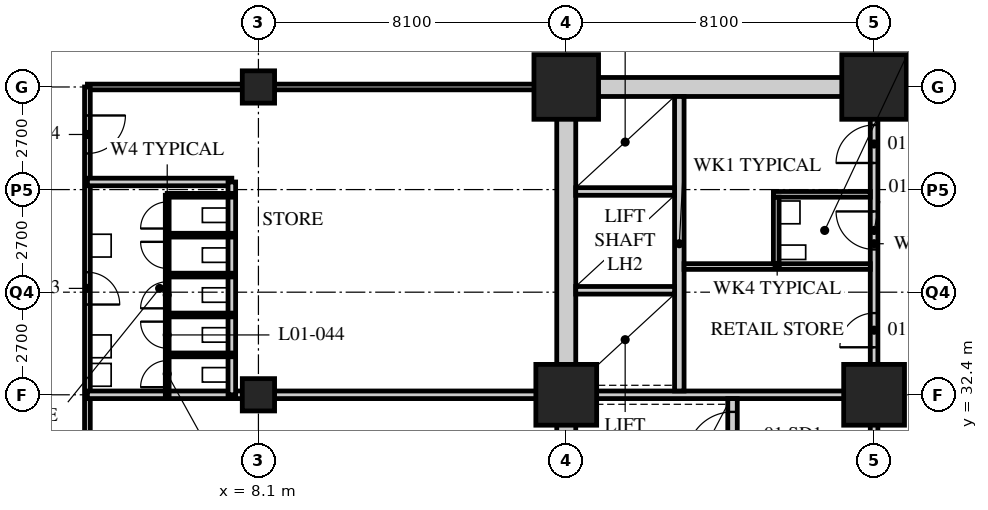
"""IFC4 building model, lengths in metres.
Left out: names, types, materials, properties, quantities, classifications, styles, units other than length and angle.
Written with IfcOpenShell. Run it as: python <this file> out.ifc"""

import sys

from ifc_helpers import new_model, si_unit, direction, frame, frame_2d, origin, origin_2d, place, context, subcontext, project, spatial, rectangle, hollow_rectangle, extrude, element, fill, save


model = new_model("IFC4")
c1 = context("Model", 3, precision=1e-05, world=origin(), true_north=direction((0.0, 1.0)))
c2 = subcontext(c1, "Body", "Model", "MODEL_VIEW")
j1 = project(units=[si_unit("LENGTHUNIT", "METRE"), si_unit("PLANEANGLEUNIT", "RADIAN")], contexts=[c1])
p1 = place(None, origin())
s1 = spatial("IfcSite", under=j1, at=p1, CompositionType="ELEMENT")
p2 = place(p1, origin())
s2 = spatial("IfcBuilding", under=s1, at=p2, CompositionType="ELEMENT")
p3 = place(p2, frame((0.0, 0.0, 6.0)))
s3 = spatial("IfcBuildingStorey", under=s2, at=p3, CompositionType="ELEMENT", Elevation=6.0)
for number, where, z_axis, x_axis in (
    (1, (8.1, 32.4, 0.0), (0.0, 0.0, 1.0), (1.0, 0.0, 0.0)),
    (2, (8.1, 40.5, 0.0), (0.0, 0.0, 1.0), (1.0, 0.0, 0.0)),
):
    element("IfcColumn", number, at=place(p3, frame(where, z_axis=z_axis, x_axis=x_axis)), inside=s3, PredefinedType="COLUMN", context=c2, shape_type="SweptSolid", body=[
        extrude(hollow_rectangle(XDim=0.85, YDim=0.85, WallThickness=0.085, at=origin_2d()), origin(), (0.0, 0.0, 1.0), 5.4),
    ])
p4 = place(p3, frame((16.2, 32.4, 0.0), z_axis=(0.0, 0.0, 1.0), x_axis=(1.0, 0.0, 0.0)))
e3 = element("IfcColumn", 3, at=p4, inside=s3, PredefinedType="COLUMN", context=c2, shape_type="SweptSolid", body=[
    extrude(hollow_rectangle(XDim=1.6, YDim=1.6, WallThickness=0.15, at=origin_2d()), origin(), (0.0, 0.0, 1.0), 5.4),
])
p5 = place(p3, frame((16.2, 40.5, 0.0), z_axis=(0.0, 0.0, 1.0), x_axis=(1.0, 0.0, 0.0)))
e4 = element("IfcColumn", 4, at=p5, inside=s3, PredefinedType="COLUMN", context=c2, shape_type="SweptSolid", body=[
    extrude(hollow_rectangle(XDim=1.7, YDim=1.7, WallThickness=0.16, at=origin_2d()), origin(), (0.0, 0.0, 1.0), 5.4),
])
p6 = place(p3, frame((24.3, 32.4, 0.0), z_axis=(0.0, 0.0, 1.0), x_axis=(1.0, 0.0, 0.0)))
e5 = element("IfcColumn", 5, at=p6, inside=s3, PredefinedType="COLUMN", context=c2, shape_type="SweptSolid", body=[
    extrude(hollow_rectangle(XDim=1.6, YDim=1.6, WallThickness=0.15, at=origin_2d()), origin(), (0.0, 0.0, 1.0), 5.4),
])
p7 = place(p3, frame((24.3, 40.5, 0.0), z_axis=(0.0, 0.0, 1.0), x_axis=(1.0, 0.0, 0.0)))
e6 = element("IfcColumn", 6, at=p7, inside=s3, PredefinedType="COLUMN", context=c2, shape_type="SweptSolid", body=[
    extrude(hollow_rectangle(XDim=1.7, YDim=1.7, WallThickness=0.16, at=origin_2d()), origin(), (0.0, 0.0, 1.0), 5.4),
])
p8 = place(p3, frame((16.0, 40.5, 0.0), z_axis=(0.0, 0.0, 1.0), x_axis=(-1.0, 0.0, 0.0)))
e7 = element("IfcWall", 7, at=p8, inside=s3, PredefinedType="PARTITIONING", context=c2, shape_type="SweptSolid", body=[
    extrude(rectangle(XDim=12.4, YDim=0.15, at=frame_2d((6.2, 0.0))), origin(), (0.0, 0.0, 1.0), 4.538),
])
p9 = place(p3, frame((3.6, 40.5, 0.0), z_axis=(0.0, 0.0, 1.0), x_axis=(0.0, -1.0, 0.0)))
e8 = element("IfcWall", 8, at=p9, inside=s3, PredefinedType="PARTITIONING", context=c2, shape_type="SweptSolid", body=[
    extrude(rectangle(XDim=36.9, YDim=0.15, at=frame_2d((18.45, 0.0))), origin(), (0.0, 0.0, 1.0), 5.15),
])
p10 = place(p9, frame((13.375, 0.0, 0.0)))
e9 = element("IfcOpeningElement", 9, at=p10, cuts=e8, PredefinedType="OPENING", context=c2, shape_type="SweptSolid", body=[
    extrude(rectangle(XDim=0.85, YDim=2.1, at=frame_2d((0.425, 1.05))), frame((0.0, 0.085, 0.0), z_axis=(0.0, -1.0, 0.0), x_axis=(1.0, 0.0, 0.0)), (0.0, 0.0, 1.0), 0.17),
])
p11 = place(p9, frame((9.25, 0.0, 0.0)))
e10 = element("IfcOpeningElement", 10, at=p11, cuts=e8, PredefinedType="OPENING", context=c2, shape_type="SweptSolid", body=[
    extrude(rectangle(XDim=1.0, YDim=2.1, at=frame_2d((0.5, 1.05))), frame((0.0, 0.085, 0.0), z_axis=(0.0, -1.0, 0.0), x_axis=(1.0, 0.0, 0.0)), (0.0, 0.0, 1.0), 0.17),
])
p12 = place(p9, frame((4.875, 0.0, 0.0)))
e11 = element("IfcOpeningElement", 11, at=p12, cuts=e8, PredefinedType="OPENING", context=c2, shape_type="SweptSolid", body=[
    extrude(rectangle(XDim=0.85, YDim=2.1, at=frame_2d((0.425, 1.05))), frame((0.0, 0.085, 0.0), z_axis=(0.0, -1.0, 0.0), x_axis=(1.0, 0.0, 0.0)), (0.0, 0.0, 1.0), 0.17),
])
p13 = place(p9, frame((0.75, 0.0, 0.0)))
e12 = element("IfcOpeningElement", 12, at=p13, cuts=e8, PredefinedType="OPENING", context=c2, shape_type="SweptSolid", body=[
    extrude(rectangle(XDim=1.0, YDim=2.1, at=frame_2d((0.5, 1.05))), frame((0.0, 0.085, 0.0), z_axis=(0.0, -1.0, 0.0), x_axis=(1.0, 0.0, 0.0)), (0.0, 0.0, 1.0), 0.17),
])
p14 = place(p3, frame((3.6, 32.4, 0.0), z_axis=(0.0, 0.0, 1.0), x_axis=(1.0, 0.0, 0.0)))
e13 = element("IfcWall", 13, at=p14, inside=s3, PredefinedType="SOLIDWALL", context=c2, shape_type="SweptSolid", body=[
    extrude(rectangle(XDim=12.6, YDim=0.2, at=frame_2d((6.3, 0.0))), origin(), (0.0, 0.0, 1.0), 4.538),
])
p15 = place(p3, frame((3.6, 38.0, 0.0), z_axis=(0.0, 0.0, 1.0), x_axis=(1.0, 0.0, 0.0)))
e14 = element("IfcWall", 14, at=p15, inside=s3, PredefinedType="SOLIDWALL", context=c2, shape_type="SweptSolid", body=[
    extrude(rectangle(XDim=3.8, YDim=0.2, at=frame_2d((1.9, 0.0))), origin(), (0.0, 0.0, 1.0), 5.15),
])
p16 = place(p3, frame((7.4, 32.4, 0.0), z_axis=(0.0, 0.0, 1.0), x_axis=(0.0, 1.0, 0.0)))
e15 = element("IfcWall", 15, at=p16, inside=s3, PredefinedType="SOLIDWALL", context=c2, shape_type="SweptSolid", body=[
    extrude(rectangle(XDim=5.6, YDim=0.2, at=frame_2d((2.8, 0.0))), origin(), (0.0, 0.0, 1.0), 5.15),
])
p17 = place(p3, frame((5.7, 32.4, 0.0), z_axis=(0.0, 0.0, 1.0), x_axis=(0.0, 1.0, 0.0)))
e16 = element("IfcWall", 16, at=p17, inside=s3, PredefinedType="PARTITIONING", context=c2, shape_type="SweptSolid", body=[
    extrude(rectangle(XDim=5.25, YDim=0.1, at=frame_2d((2.625, 0.0))), origin(), (0.0, 0.0, 1.0), 5.15),
])
p18 = place(p17, frame((0.2, 0.0, 0.0)))
e17 = element("IfcOpeningElement", 17, at=p18, cuts=e16, PredefinedType="OPENING", context=c2, shape_type="SweptSolid", body=[
    extrude(rectangle(XDim=0.7, YDim=2.0, at=frame_2d((0.35, 1.0))), frame((0.0, 0.06, 0.0), z_axis=(0.0, -1.0, 0.0), x_axis=(1.0, 0.0, 0.0)), (0.0, 0.0, 1.0), 0.12),
])
p19 = place(p17, frame((1.225, 0.0, 0.0)))
e18 = element("IfcOpeningElement", 18, at=p19, cuts=e16, PredefinedType="OPENING", context=c2, shape_type="SweptSolid", body=[
    extrude(rectangle(XDim=0.7, YDim=2.0, at=frame_2d((0.35, 1.0))), frame((0.0, 0.06, 0.0), z_axis=(0.0, -1.0, 0.0), x_axis=(1.0, 0.0, 0.0)), (0.0, 0.0, 1.0), 0.12),
])
p20 = place(p17, frame((2.275, 0.0, 0.0)))
e19 = element("IfcOpeningElement", 19, at=p20, cuts=e16, PredefinedType="OPENING", context=c2, shape_type="SweptSolid", body=[
    extrude(rectangle(XDim=0.7, YDim=2.0, at=frame_2d((0.35, 1.0))), frame((0.0, 0.06, 0.0), z_axis=(0.0, -1.0, 0.0), x_axis=(1.0, 0.0, 0.0)), (0.0, 0.0, 1.0), 0.12),
])
p21 = place(p17, frame((3.325, 0.0, 0.0)))
e20 = element("IfcOpeningElement", 20, at=p21, cuts=e16, PredefinedType="OPENING", context=c2, shape_type="SweptSolid", body=[
    extrude(rectangle(XDim=0.7, YDim=2.0, at=frame_2d((0.35, 1.0))), frame((0.0, 0.06, 0.0), z_axis=(0.0, -1.0, 0.0), x_axis=(1.0, 0.0, 0.0)), (0.0, 0.0, 1.0), 0.12),
])
p22 = place(p17, frame((4.375, 0.0, 0.0)))
e21 = element("IfcOpeningElement", 21, at=p22, cuts=e16, PredefinedType="OPENING", context=c2, shape_type="SweptSolid", body=[
    extrude(rectangle(XDim=0.7, YDim=2.0, at=frame_2d((0.35, 1.0))), frame((0.0, 0.06, 0.0), z_axis=(0.0, -1.0, 0.0), x_axis=(1.0, 0.0, 0.0)), (0.0, 0.0, 1.0), 0.12),
])
for number, where, z_axis, x_axis in (
    (22, (5.7, 33.45, 0.0), (0.0, 0.0, 1.0), (1.0, 0.0, 0.0)),
    (23, (5.7, 34.5, 0.0), (0.0, 0.0, 1.0), (1.0, 0.0, 0.0)),
    (24, (5.7, 35.55, 0.0), (0.0, 0.0, 1.0), (1.0, 0.0, 0.0)),
    (25, (5.7, 36.6, 0.0), (0.0, 0.0, 1.0), (1.0, 0.0, 0.0)),
    (26, (5.7, 37.65, 0.0), (0.0, 0.0, 1.0), (1.0, 0.0, 0.0)),
):
    element("IfcWall", number, at=place(p3, frame(where, z_axis=z_axis, x_axis=x_axis)), inside=s3, PredefinedType="PARTITIONING", context=c2, shape_type="SweptSolid", body=[
        extrude(rectangle(XDim=1.7, YDim=0.1, at=frame_2d((0.85, 0.0))), origin(), (0.0, 0.0, 1.0), 5.15),
    ])
p23 = place(p3, frame((15.95, 40.5, 0.0), z_axis=(0.0, 0.0, 1.0), x_axis=(1.0, 0.0, 0.0)))
e27 = element("IfcWall", 27, at=p23, inside=s3, PredefinedType="SOLIDWALL", context=c2, shape_type="SweptSolid", body=[
    extrude(rectangle(XDim=24.8, YDim=0.5, at=frame_2d((12.4, 0.0))), origin(), (0.0, 0.0, 1.0), 4.5),
])
p24 = place(p23, frame((11.5, 0.0, 0.0)))
e28 = element("IfcOpeningElement", 28, at=p24, cuts=e27, PredefinedType="OPENING", context=c2, shape_type="SweptSolid", body=[
    extrude(rectangle(XDim=1.8, YDim=2.4, at=frame_2d((0.9, 1.2))), frame((0.0, 0.26, 0.0), z_axis=(0.0, -1.0, 0.0), x_axis=(1.0, 0.0, 0.0)), (0.0, 0.0, 1.0), 0.52),
])
p25 = place(p3, frame((16.2, 24.55, 0.0), z_axis=(0.0, 0.0, 1.0), x_axis=(0.0, 1.0, 0.0)))
e29 = element("IfcWall", 29, at=p25, inside=s3, PredefinedType="SOLIDWALL", context=c2, shape_type="SweptSolid", body=[
    extrude(rectangle(XDim=15.7, YDim=0.5, at=frame_2d((7.85, 0.0))), origin(), (0.0, 0.0, 1.0), 4.538),
])
p26 = place(p3, frame((16.45, 32.4, 0.0), z_axis=(0.0, 0.0, 1.0), x_axis=(1.0, 0.0, 0.0)))
e30 = element("IfcWall", 30, at=p26, inside=s3, PredefinedType="SOLIDWALL", context=c2, shape_type="SweptSolid", body=[
    extrude(rectangle(XDim=7.95, YDim=0.2, at=frame_2d((3.975, 0.0))), origin(), (0.0, 0.0, 1.0), 4.45),
])
p27 = place(p3, frame((24.3, 24.55, 0.0), z_axis=(0.0, 0.0, 1.0), x_axis=(0.0, 1.0, 0.0)))
e31 = element("IfcWall", 31, at=p27, inside=s3, PredefinedType="SOLIDWALL", context=c2, shape_type="SweptSolid", body=[
    extrude(rectangle(XDim=7.75, YDim=0.2, at=frame_2d((3.875, 0.0))), origin(), (0.0, 0.0, 1.0), 4.45),
])
p28 = place(p27, frame((4.6, 0.0, 0.0)))
e32 = element("IfcOpeningElement", 32, at=p28, cuts=e31, PredefinedType="OPENING", context=c2, shape_type="SweptSolid", body=[
    extrude(rectangle(XDim=1.2, YDim=2.1, at=frame_2d((0.6, 1.05))), frame((0.0, 0.11, 0.0), z_axis=(0.0, -1.0, 0.0), x_axis=(1.0, 0.0, 0.0)), (0.0, 0.0, 1.0), 0.22),
])
p29 = place(p3, frame((20.575, 24.55, 0.0), z_axis=(0.0, 0.0, 1.0), x_axis=(0.0, 1.0, 0.0)))
e33 = element("IfcWall", 33, at=p29, inside=s3, PredefinedType="SOLIDWALL", context=c2, shape_type="SweptSolid", body=[
    extrude(rectangle(XDim=7.75, YDim=0.25, at=frame_2d((3.875, 0.0))), origin(), (0.0, 0.0, 1.0), 5.15),
])
p30 = place(p29, frame((6.2, 0.0, 0.0)))
e34 = element("IfcOpeningElement", 34, at=p30, cuts=e33, PredefinedType="OPENING", context=c2, shape_type="SweptSolid", body=[
    extrude(rectangle(XDim=1.2, YDim=2.1, at=frame_2d((0.6, 1.05))), frame((0.0, 0.135, 0.0), z_axis=(0.0, -1.0, 0.0), x_axis=(1.0, 0.0, 0.0)), (0.0, 0.0, 1.0), 0.27),
])
p31 = place(p3, frame((19.175, 32.5, 0.0), z_axis=(0.0, 0.0, 1.0), x_axis=(0.0, 1.0, 0.0)))
e35 = element("IfcWall", 35, at=p31, inside=s3, PredefinedType="SOLIDWALL", context=c2, shape_type="SweptSolid", body=[
    extrude(rectangle(XDim=7.75, YDim=0.25, at=frame_2d((3.875, 0.0))), origin(), (0.0, 0.0, 1.0), 5.15),
])
for number, where, z_axis, x_axis in (
    (36, (16.45, 35.15, 0.0), (0.0, 0.0, 1.0), (1.0, 0.0, 0.0)),
    (37, (16.45, 37.75, 0.0), (0.0, 0.0, 1.0), (1.0, 0.0, 0.0)),
):
    element("IfcWall", number, at=place(p3, frame(where, z_axis=z_axis, x_axis=x_axis)), inside=s3, PredefinedType="SOLIDWALL", context=c2, shape_type="SweptSolid", body=[
        extrude(rectangle(XDim=2.6, YDim=0.2, at=frame_2d((1.3, 0.0))), origin(), (0.0, 0.0, 1.0), 5.15),
    ])
p32 = place(p3, frame((24.3, 32.5, 0.0), z_axis=(0.0, 0.0, 1.0), x_axis=(0.0, 1.0, 0.0)))
e38 = element("IfcWall", 38, at=p32, inside=s3, PredefinedType="PARTITIONING", context=c2, shape_type="SweptSolid", body=[
    extrude(rectangle(XDim=7.75, YDim=0.2, at=frame_2d((3.875, 0.0))), origin(), (0.0, 0.0, 1.0), 4.45),
])
p33 = place(p32, frame((1.15, 0.0, 0.0)))
e39 = element("IfcOpeningElement", 39, at=p33, cuts=e38, PredefinedType="OPENING", context=c2, shape_type="SweptSolid", body=[
    extrude(rectangle(XDim=0.9, YDim=2.1, at=frame_2d((0.45, 1.05))), frame((0.0, 0.11, 0.0), z_axis=(0.0, -1.0, 0.0), x_axis=(1.0, 0.0, 0.0)), (0.0, 0.0, 1.0), 0.22),
])
p34 = place(p32, frame((3.725, 0.0, 0.0)))
e40 = element("IfcOpeningElement", 40, at=p34, cuts=e38, PredefinedType="OPENING", context=c2, shape_type="SweptSolid", body=[
    extrude(rectangle(XDim=1.0, YDim=2.1, at=frame_2d((0.5, 1.05))), frame((0.0, 0.11, 0.0), z_axis=(0.0, -1.0, 0.0), x_axis=(1.0, 0.0, 0.0)), (0.0, 0.0, 1.0), 0.22),
])
p35 = place(p32, frame((6.0, 0.0, 0.0)))
e41 = element("IfcOpeningElement", 41, at=p35, cuts=e38, PredefinedType="OPENING", context=c2, shape_type="SweptSolid", body=[
    extrude(rectangle(XDim=1.0, YDim=2.1, at=frame_2d((0.5, 1.05))), frame((0.0, 0.11, 0.0), z_axis=(0.0, -1.0, 0.0), x_axis=(1.0, 0.0, 0.0)), (0.0, 0.0, 1.0), 0.22),
])
p36 = place(p3, frame((19.3, 35.775, 0.0), z_axis=(0.0, 0.0, 1.0), x_axis=(1.0, 0.0, 0.0)))
e42 = element("IfcWall", 42, at=p36, inside=s3, PredefinedType="PARTITIONING", context=c2, shape_type="SweptSolid", body=[
    extrude(rectangle(XDim=4.9, YDim=0.15, at=frame_2d((2.45, 0.0))), origin(), (0.0, 0.0, 1.0), 5.15),
])
p37 = place(p3, frame((21.65, 37.675, 0.0), z_axis=(0.0, 0.0, 1.0), x_axis=(1.0, 0.0, 0.0)))
e43 = element("IfcWall", 43, at=p37, inside=s3, PredefinedType="PARTITIONING", context=c2, shape_type="SweptSolid", body=[
    extrude(rectangle(XDim=2.55, YDim=0.15, at=frame_2d((1.275, 0.0))), origin(), (0.0, 0.0, 1.0), 5.15),
])
p38 = place(p3, frame((21.725, 35.85, 0.0), z_axis=(0.0, 0.0, 1.0), x_axis=(0.0, 1.0, 0.0)))
e44 = element("IfcWall", 44, at=p38, inside=s3, PredefinedType="PARTITIONING", context=c2, shape_type="SweptSolid", body=[
    extrude(rectangle(XDim=1.75, YDim=0.15, at=frame_2d((0.875, 0.0))), origin(), (0.0, 0.0, 1.0), 5.15),
])
p39 = place(p12, origin())
e45 = element("IfcDoor", 45, at=p39, inside=s3, OperationType="SINGLE_SWING_RIGHT", PredefinedType="DOOR", context=c2, shape_type="SweptSolid", body=[
    extrude(rectangle(XDim=0.85, YDim=2.1, at=frame_2d((0.425, 1.05))), frame((0.0, 0.025, 0.0), z_axis=(0.0, -1.0, 0.0), x_axis=(1.0, 0.0, 0.0)), (0.0, 0.0, 1.0), 0.05),
])
fill(e11, e45)
p40 = place(p13, origin())
e46 = element("IfcDoor", 46, at=p40, inside=s3, OperationType="SINGLE_SWING_LEFT", PredefinedType="DOOR", context=c2, shape_type="SweptSolid", body=[
    extrude(rectangle(XDim=1.0, YDim=2.1, at=frame_2d((0.5, 1.05))), frame((0.0, 0.025, 0.0), z_axis=(0.0, -1.0, 0.0), x_axis=(1.0, 0.0, 0.0)), (0.0, 0.0, 1.0), 0.05),
])
fill(e12, e46)
p41 = place(p18, origin())
e47 = element("IfcDoor", 47, at=p41, inside=s3, OperationType="SINGLE_SWING_LEFT", PredefinedType="DOOR", context=c2, shape_type="SweptSolid", body=[
    extrude(rectangle(XDim=0.7, YDim=2.0, at=frame_2d((0.35, 1.0))), frame((0.0, 0.025, 0.0), z_axis=(0.0, -1.0, 0.0), x_axis=(1.0, 0.0, 0.0)), (0.0, 0.0, 1.0), 0.05),
])
fill(e17, e47)
p42 = place(p19, origin())
e48 = element("IfcDoor", 48, at=p42, inside=s3, OperationType="SINGLE_SWING_RIGHT", PredefinedType="DOOR", context=c2, shape_type="SweptSolid", body=[
    extrude(rectangle(XDim=0.7, YDim=2.0, at=frame_2d((0.35, 1.0))), frame((0.0, 0.025, 0.0), z_axis=(0.0, -1.0, 0.0), x_axis=(1.0, 0.0, 0.0)), (0.0, 0.0, 1.0), 0.05),
])
fill(e18, e48)
p43 = place(p20, origin())
e49 = element("IfcDoor", 49, at=p43, inside=s3, OperationType="SINGLE_SWING_LEFT", PredefinedType="DOOR", context=c2, shape_type="SweptSolid", body=[
    extrude(rectangle(XDim=0.7, YDim=2.0, at=frame_2d((0.35, 1.0))), frame((0.0, 0.025, 0.0), z_axis=(0.0, -1.0, 0.0), x_axis=(1.0, 0.0, 0.0)), (0.0, 0.0, 1.0), 0.05),
])
fill(e19, e49)
p44 = place(p21, origin())
e50 = element("IfcDoor", 50, at=p44, inside=s3, OperationType="SINGLE_SWING_RIGHT", PredefinedType="DOOR", context=c2, shape_type="SweptSolid", body=[
    extrude(rectangle(XDim=0.7, YDim=2.0, at=frame_2d((0.35, 1.0))), frame((0.0, 0.025, 0.0), z_axis=(0.0, -1.0, 0.0), x_axis=(1.0, 0.0, 0.0)), (0.0, 0.0, 1.0), 0.05),
])
fill(e20, e50)
p45 = place(p22, origin())
e51 = element("IfcDoor", 51, at=p45, inside=s3, OperationType="SINGLE_SWING_LEFT", PredefinedType="DOOR", context=c2, shape_type="SweptSolid", body=[
    extrude(rectangle(XDim=0.7, YDim=2.0, at=frame_2d((0.35, 1.0))), frame((0.0, 0.025, 0.0), z_axis=(0.0, -1.0, 0.0), x_axis=(1.0, 0.0, 0.0)), (0.0, 0.0, 1.0), 0.05),
])
fill(e21, e51)
p46 = place(p33, origin())
e52 = element("IfcDoor", 52, at=p46, inside=s3, OperationType="SINGLE_SWING_LEFT", PredefinedType="DOOR", context=c2, shape_type="SweptSolid", body=[
    extrude(rectangle(XDim=0.9, YDim=2.1, at=frame_2d((0.45, 1.05))), frame((0.0, 0.025, 0.0), z_axis=(0.0, -1.0, 0.0), x_axis=(1.0, 0.0, 0.0)), (0.0, 0.0, 1.0), 0.05),
])
fill(e39, e52)
p47 = place(p34, origin())
e53 = element("IfcDoor", 53, at=p47, inside=s3, OperationType="SINGLE_SWING_RIGHT", PredefinedType="DOOR", context=c2, shape_type="SweptSolid", body=[
    extrude(rectangle(XDim=1.0, YDim=2.1, at=frame_2d((0.5, 1.05))), frame((0.0, 0.025, 0.0), z_axis=(0.0, -1.0, 0.0), x_axis=(1.0, 0.0, 0.0)), (0.0, 0.0, 1.0), 0.05),
])
fill(e40, e53)
p48 = place(p35, origin())
e54 = element("IfcDoor", 54, at=p48, inside=s3, OperationType="SINGLE_SWING_LEFT", PredefinedType="DOOR", context=c2, shape_type="SweptSolid", body=[
    extrude(rectangle(XDim=1.0, YDim=2.1, at=frame_2d((0.5, 1.05))), frame((0.0, 0.025, 0.0), z_axis=(0.0, -1.0, 0.0), x_axis=(1.0, 0.0, 0.0)), (0.0, 0.0, 1.0), 0.05),
])
fill(e41, e54)
p49 = place(p30, origin())
e55 = element("IfcDoor", 55, at=p49, inside=s3, OperationType="SINGLE_SWING_LEFT", PredefinedType="DOOR", context=c2, shape_type="SweptSolid", body=[
    extrude(rectangle(XDim=1.2, YDim=2.1, at=frame_2d((0.6, 1.05))), frame((0.0, 0.025, 0.0), z_axis=(0.0, -1.0, 0.0), x_axis=(1.0, 0.0, 0.0)), (0.0, 0.0, 1.0), 0.05),
])
fill(e34, e55)
save(model, sys.argv[1])
